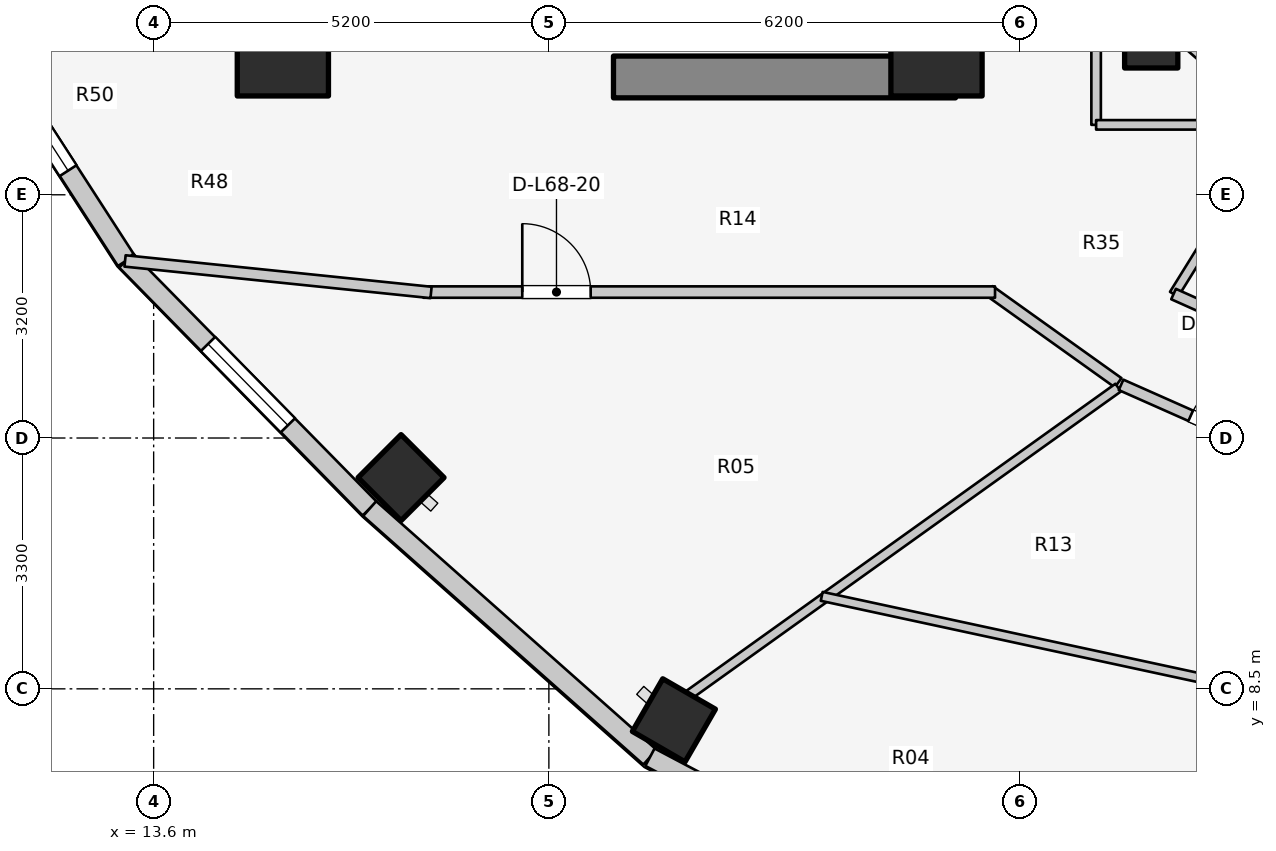
"""IFC4 building model, lengths in metres.
Left out: names, types, materials, properties, quantities, classifications, styles, units other than length and angle.
Written with IfcOpenShell. Run it as: python <this file> out.ifc"""

import sys

from ifc_helpers import new_model, si_unit, direction, frame, frame_2d, origin, origin_2d, place, context, subcontext, project, spatial, rectangle, extrude, element, fill, save


model = new_model("IFC4")
c1 = context("Model", 3, precision=1e-05, world=origin(), true_north=direction((0.0, 1.0)))
c2 = subcontext(c1, "Body", "Model", "MODEL_VIEW")
j1 = project(units=[si_unit("LENGTHUNIT", "METRE"), si_unit("PLANEANGLEUNIT", "RADIAN")], contexts=[c1])
p1 = place(None, origin())
s1 = spatial("IfcSite", under=j1, at=p1, CompositionType="ELEMENT")
p2 = place(p1, origin())
s2 = spatial("IfcBuilding", under=s1, at=p2, CompositionType="ELEMENT")
p3 = place(p2, frame((0.0, 0.0, 223.3)))
s3 = spatial("IfcBuildingStorey", under=s2, at=p3, CompositionType="ELEMENT", Elevation=223.3)
p4 = place(p3, frame((19.65, 16.55, 0.0), z_axis=(0.0, 0.0, 1.0), x_axis=(1.0, 0.0, 0.0)))
e1 = element("IfcWall", 1, at=p4, inside=s3, PredefinedType="SHEAR", context=c2, shape_type="SweptSolid", body=[
    extrude(rectangle(XDim=4.5, YDim=0.55, at=frame_2d((2.25, 0.0))), origin(), (0.0, 0.0, 1.0), 3.1),
])
for number, where, z_axis, x_axis in (
    (2, (15.3, 16.9, 0.0), (0.0, 0.0, 1.0), (1.0, 0.0, 0.0)),
    (3, (23.9, 16.9, 0.0), (0.0, 0.0, 1.0), (1.0, 0.0, 0.0)),
):
    element("IfcColumn", number, at=place(p3, frame(where, z_axis=z_axis, x_axis=x_axis)), inside=s3, PredefinedType="COLUMN", context=c2, shape_type="SweptSolid", body=[
        extrude(rectangle(XDim=1.2, YDim=1.2, at=origin_2d()), origin(), (0.0, 0.0, 1.0), 3.1),
    ])
p5 = place(p3, frame((26.725, 17.018, 0.0), z_axis=(0.0, 0.0, 1.0), x_axis=(1.0, 0.0, 0.0)))
e4 = element("IfcColumn", 4, at=p5, inside=s3, PredefinedType="COLUMN", context=c2, shape_type="SweptSolid", body=[
    extrude(rectangle(XDim=0.7, YDim=0.7, at=origin_2d()), origin(), (0.0, 0.0, 1.0), 3.1),
])
for number, where, z_axis, x_axis in (
    (5, (16.855, 11.279, 0.0), (0.0, 0.0, 1.0), (-0.707, -0.707, 0.0)),
    (6, (20.445, 8.086, 0.0), (0.0, 0.0, 1.0), (-0.5, -0.866, 0.0)),
):
    element("IfcColumn", number, at=place(p3, frame(where, z_axis=z_axis, x_axis=x_axis)), inside=s3, PredefinedType="COLUMN", context=c2, shape_type="SweptSolid", body=[
        extrude(rectangle(XDim=0.8, YDim=0.8, at=origin_2d()), origin(), (0.0, 0.0, 1.0), 3.1),
    ])
p6 = place(p3, frame((26.965, 17.258, 0.0), z_axis=(0.0, 0.0, 1.0), x_axis=(0.752576694707, -0.658504607869, 0.0)))
e7 = element("IfcWall", 7, at=p6, inside=s3, PredefinedType="STANDARD", context=c2, shape_type="SweptSolid", body=[
    extrude(rectangle(XDim=1.959, YDim=0.23, at=frame_2d((0.98, 0.0))), origin(), (0.0, 0.0, 1.0), 2.16),
])
p7 = place(p3, frame((10.895, 17.761, 0.0), z_axis=(0.0, 0.0, 1.0), x_axis=(0.542641766008, -0.839964233634, 0.0)))
e8 = element("IfcWall", 8, at=p7, inside=s3, PredefinedType="STANDARD", context=c2, shape_type="SweptSolid", body=[
    extrude(rectangle(XDim=4.319, YDim=0.26, at=frame_2d((2.16, 0.0))), origin(), (0.0, 0.0, 1.0), 2.85),
])
p8 = place(p7, frame((1.41, 0.0, 0.75)))
e9 = element("IfcOpeningElement", 9, at=p8, cuts=e8, PredefinedType="OPENING", context=c2, shape_type="SweptSolid", body=[
    extrude(rectangle(XDim=1.5, YDim=1.6, at=frame_2d((0.75, 0.8))), frame((0.0, 0.14, 0.0), z_axis=(0.0, -1.0, 0.0), x_axis=(1.0, 0.0, 0.0)), (0.0, 0.0, 1.0), 0.28),
])
p9 = place(p3, frame((13.239, 14.133, 0.0), z_axis=(0.0, 0.0, 1.0), x_axis=(0.700642973333, -0.713512034881, 0.0)))
e10 = element("IfcWall", 10, at=p9, inside=s3, PredefinedType="STANDARD", context=c2, shape_type="SweptSolid", body=[
    extrude(rectangle(XDim=4.572, YDim=0.26, at=frame_2d((2.286, 0.0))), origin(), (0.0, 0.0, 1.0), 2.85),
])
p10 = place(p9, frame((1.536, 0.0, 0.75)))
e11 = element("IfcOpeningElement", 11, at=p10, cuts=e10, PredefinedType="OPENING", context=c2, shape_type="SweptSolid", body=[
    extrude(rectangle(XDim=1.5, YDim=1.6, at=frame_2d((0.75, 0.8))), frame((0.0, 0.14, 0.0), z_axis=(0.0, -1.0, 0.0), x_axis=(1.0, 0.0, 0.0)), (0.0, 0.0, 1.0), 0.28),
])
p11 = place(p3, frame((16.442, 10.871, 0.0), z_axis=(0.0, 0.0, 1.0), x_axis=(0.748165854006, -0.663511759428, 0.0)))
e12 = element("IfcWall", 12, at=p11, inside=s3, PredefinedType="STANDARD", context=c2, shape_type="SweptSolid", body=[
    extrude(rectangle(XDim=4.929, YDim=0.26, at=frame_2d((2.464, 0.0))), origin(), (0.0, 0.0, 1.0), 2.85),
])
p12 = place(p3, frame((20.13, 7.601, 0.0), z_axis=(0.0, 0.0, 1.0), x_axis=(0.884000981341, -0.46748504253, 0.0)))
e13 = element("IfcWall", 13, at=p12, inside=s3, PredefinedType="STANDARD", context=c2, shape_type="SweptSolid", body=[
    extrude(rectangle(XDim=5.46, YDim=0.26, at=frame_2d((2.73, 0.0))), origin(), (0.0, 0.0, 1.0), 2.85),
])
p13 = place(p12, frame((1.53, 0.0, 0.75)))
e14 = element("IfcOpeningElement", 14, at=p13, cuts=e13, PredefinedType="OPENING", context=c2, shape_type="SweptSolid", body=[
    extrude(rectangle(XDim=2.4, YDim=1.7, at=frame_2d((1.2, 0.85))), frame((0.0, 0.14, 0.0), z_axis=(0.0, -1.0, 0.0), x_axis=(1.0, 0.0, 0.0)), (0.0, 0.0, 1.0), 0.28),
])
p14 = place(p3, frame((28.45, 15.985, 0.0), z_axis=(0.0, 0.0, 1.0), x_axis=(-0.527527080983, -0.849538215049, 0.0)))
e15 = element("IfcWall", 15, at=p14, inside=s3, PredefinedType="PARTITIONING", context=c2, shape_type="SweptSolid", body=[
    extrude(rectangle(XDim=2.701, YDim=0.125, at=frame_2d((1.351, 0.0))), origin(), (0.0, 0.0, 1.0), 2.376),
])
p15 = place(p3, frame((27.019, 13.694, 0.0), z_axis=(0.0, 0.0, 1.0), x_axis=(0.912628408652, -0.408790151203, 0.0)))
e16 = element("IfcWall", 16, at=p15, inside=s3, PredefinedType="PARTITIONING", context=c2, shape_type="SweptSolid", body=[
    extrude(rectangle(XDim=2.638, YDim=0.15, at=frame_2d((1.319, 0.0))), origin(), (0.0, 0.0, 1.0), 2.376),
])
p16 = place(p3, frame((26.0, 15.92, 0.0), z_axis=(0.0, 0.0, 1.0), x_axis=(0.0, 1.0, 0.0)))
e17 = element("IfcWall", 17, at=p16, inside=s3, PredefinedType="PARTITIONING", context=c2, shape_type="SweptSolid", body=[
    extrude(rectangle(XDim=4.28, YDim=0.125, at=frame_2d((2.14, 0.0))), origin(), (0.0, 0.0, 1.0), 2.232),
])
p17 = place(p3, frame((26.0, 15.92, 0.0), z_axis=(0.0, 0.0, 1.0), x_axis=(1.0, 0.0, 0.0)))
e18 = element("IfcWall", 18, at=p17, inside=s3, PredefinedType="PARTITIONING", context=c2, shape_type="SweptSolid", body=[
    extrude(rectangle(XDim=2.6, YDim=0.125, at=frame_2d((1.3, 0.0))), origin(), (0.0, 0.0, 1.0), 2.232),
])
p18 = place(p3, frame((26.29, 12.527, 0.0), z_axis=(0.0, 0.0, 1.0), x_axis=(-0.813780999276, 0.581171648669, 0.0)))
e19 = element("IfcWall", 19, at=p18, inside=s3, PredefinedType="PARTITIONING", context=c2, shape_type="SweptSolid", body=[
    extrude(rectangle(XDim=2.082, YDim=0.15, at=frame_2d((1.041, 0.0))), origin(), (0.0, 0.0, 1.0), 2.376),
])
p19 = place(p3, frame((17.15, 13.72, 0.0), z_axis=(0.0, 0.0, 1.0), x_axis=(1.0, 0.0, 0.0)))
e20 = element("IfcWall", 20, at=p19, inside=s3, PredefinedType="PARTITIONING", context=c2, shape_type="SweptSolid", body=[
    extrude(rectangle(XDim=7.52, YDim=0.15, at=frame_2d((3.76, 0.0))), origin(), (0.0, 0.0, 1.0), 2.376),
])
p20 = place(p19, frame((1.3, 0.0, 0.0)))
e21 = element("IfcOpeningElement", 21, at=p20, cuts=e20, PredefinedType="OPENING", context=c2, shape_type="SweptSolid", body=[
    extrude(rectangle(XDim=0.9, YDim=2.1, at=frame_2d((0.45, 1.05))), frame((0.0, 0.085, 0.0), z_axis=(0.0, -1.0, 0.0), x_axis=(1.0, 0.0, 0.0)), (0.0, 0.0, 1.0), 0.17),
])
p21 = place(p3, frame((17.25, 13.715, 0.0), z_axis=(0.0, 0.0, 1.0), x_axis=(-0.994734711466, 0.102483431859, 0.0)))
e22 = element("IfcWall", 22, at=p21, inside=s3, PredefinedType="PARTITIONING", context=c2, shape_type="SweptSolid", body=[
    extrude(rectangle(XDim=4.047, YDim=0.15, at=frame_2d((2.024, 0.0))), origin(), (0.0, 0.0, 1.0), 2.22),
])
p22 = place(p3, frame((26.29, 12.463, 0.0), z_axis=(0.0, 0.0, 1.0), x_axis=(-0.813163816543, -0.582034885093, 0.0)))
e23 = element("IfcWall", 23, at=p22, inside=s3, PredefinedType="PARTITIONING", context=c2, shape_type="SweptSolid", body=[
    extrude(rectangle(XDim=6.955, YDim=0.125, at=frame_2d((3.477, 0.0))), origin(), (0.0, 0.0, 1.0), 2.376),
])
p23 = place(p3, frame((22.39, 9.717, 0.0), z_axis=(0.0, 0.0, 1.0), x_axis=(0.977534972695, -0.210773283785, 0.0)))
e24 = element("IfcWall", 24, at=p23, inside=s3, PredefinedType="MOVABLE", context=c2, shape_type="SweptSolid", body=[
    extrude(rectangle(XDim=5.453, YDim=0.12, at=frame_2d((2.727, 0.0))), origin(), (0.0, 0.0, 1.0), 2.376),
])
p24 = place(p3, frame((26.328, 12.499, 0.0), z_axis=(0.0, 0.0, 1.0), x_axis=(0.914139569865, -0.405399613724, 0.0)))
e25 = element("IfcWall", 25, at=p24, inside=s3, PredefinedType="PARTITIONING", context=c2, shape_type="SweptSolid", body=[
    extrude(rectangle(XDim=3.005, YDim=0.15, at=frame_2d((1.502, 0.0))), origin(), (0.0, 0.0, 1.0), 2.376),
])
p25 = place(p24, frame((1.002, 0.0, 0.0)))
e26 = element("IfcOpeningElement", 26, at=p25, cuts=e25, PredefinedType="OPENING", context=c2, shape_type="SweptSolid", body=[
    extrude(rectangle(XDim=1.0, YDim=2.1, at=frame_2d((0.5, 1.05))), frame((0.0, 0.085, 0.0), z_axis=(0.0, -1.0, 0.0), x_axis=(1.0, 0.0, 0.0)), (0.0, 0.0, 1.0), 0.17),
])
p26 = place(p8, origin())
e27 = element("IfcWindow", 27, at=p26, inside=s3, PartitioningType="SINGLE_PANEL", PredefinedType="WINDOW", context=c2, shape_type="SweptSolid", body=[
    extrude(rectangle(XDim=1.5, YDim=1.6, at=frame_2d((0.75, 0.8))), frame((0.0, 0.03, 0.0), z_axis=(0.0, -1.0, 0.0), x_axis=(1.0, 0.0, 0.0)), (0.0, 0.0, 1.0), 0.06),
])
fill(e9, e27)
p27 = place(p10, origin())
e28 = element("IfcWindow", 28, at=p27, inside=s3, PartitioningType="SINGLE_PANEL", PredefinedType="WINDOW", context=c2, shape_type="SweptSolid", body=[
    extrude(rectangle(XDim=1.5, YDim=1.6, at=frame_2d((0.75, 0.8))), frame((0.0, 0.03, 0.0), z_axis=(0.0, -1.0, 0.0), x_axis=(1.0, 0.0, 0.0)), (0.0, 0.0, 1.0), 0.06),
])
fill(e11, e28)
p28 = place(p20, origin())
e29 = element("IfcDoor", 29, at=p28, inside=s3, OperationType="SINGLE_SWING_LEFT", PredefinedType="DOOR", context=c2, shape_type="SweptSolid", body=[
    extrude(rectangle(XDim=0.9, YDim=2.1, at=frame_2d((0.45, 1.05))), frame((0.0, 0.025, 0.0), z_axis=(0.0, -1.0, 0.0), x_axis=(1.0, 0.0, 0.0)), (0.0, 0.0, 1.0), 0.05),
])
fill(e21, e29)
p29 = place(p25, origin())
e30 = element("IfcDoor", 30, at=p29, inside=s3, OperationType="SINGLE_SWING_RIGHT", PredefinedType="DOOR", context=c2, shape_type="SweptSolid", body=[
    extrude(rectangle(XDim=1.0, YDim=2.1, at=frame_2d((0.5, 1.05))), frame((0.0, 0.025, 0.0), z_axis=(0.0, -1.0, 0.0), x_axis=(1.0, 0.0, 0.0)), (0.0, 0.0, 1.0), 0.05),
])
fill(e26, e30)
save(model, sys.argv[1])
